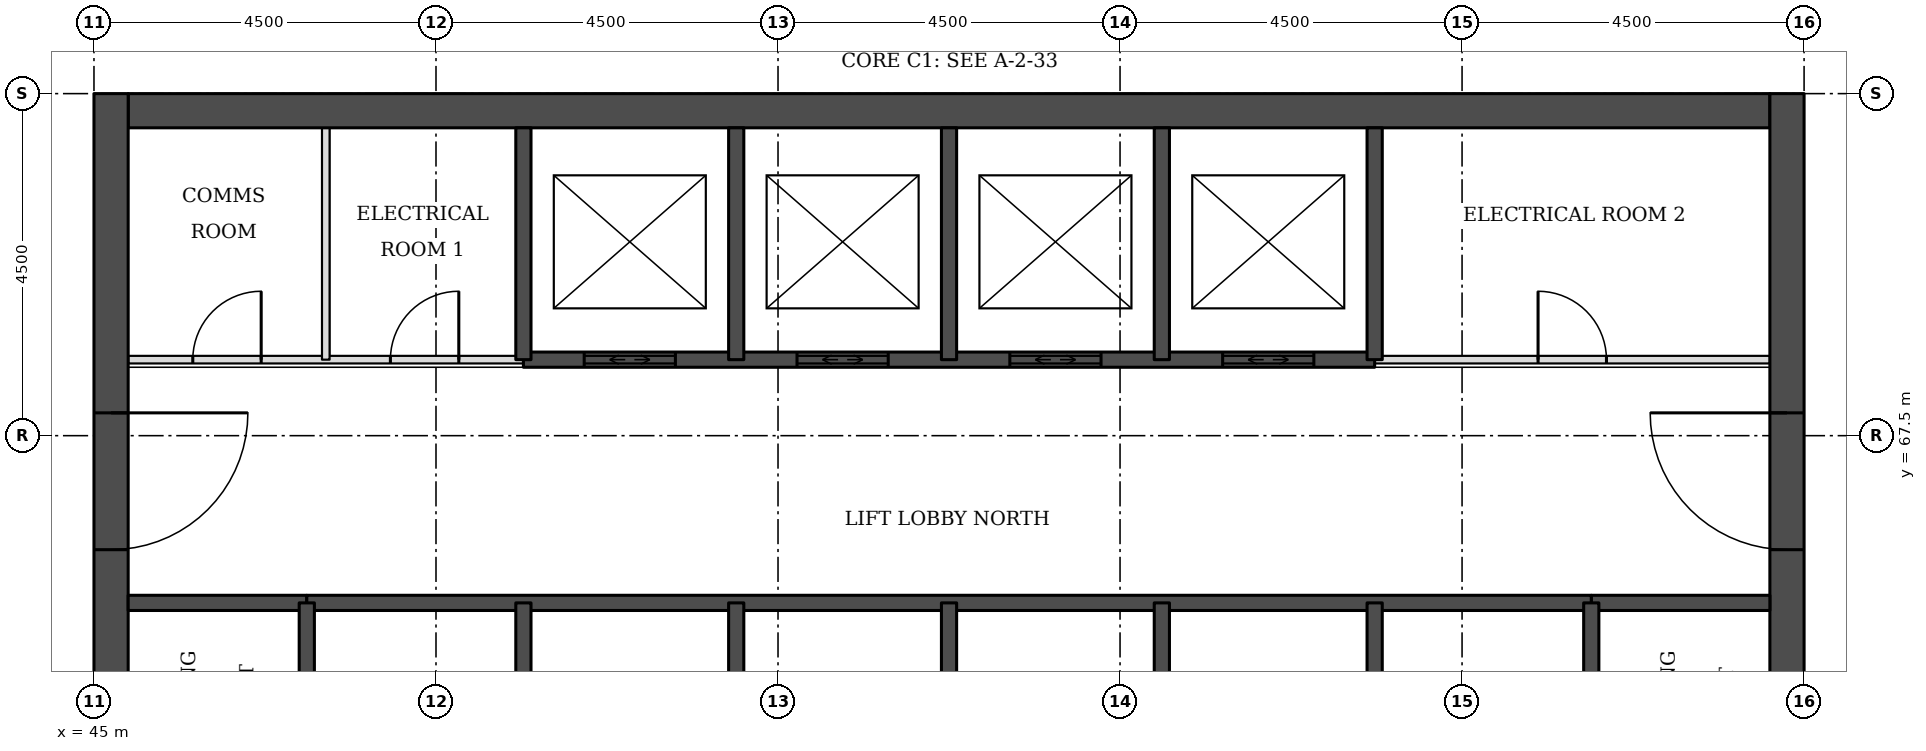
"""IFC4 building model, lengths in metres.
Left out: names, types, materials, properties, quantities, classifications, styles, units other than length and angle.
Written with IfcOpenShell. Run it as: python <this file> out.ifc"""

import sys

from ifc_helpers import new_model, si_unit, direction, frame, frame_2d, origin, place, context, subcontext, project, spatial, rectangle, extrude, element, fill, save


model = new_model("IFC4")
c1 = context("Model", 3, precision=1e-05, world=origin(), true_north=direction((0.0, 1.0)))
c2 = subcontext(c1, "Body", "Model", "MODEL_VIEW")
j1 = project(units=[si_unit("LENGTHUNIT", "METRE"), si_unit("PLANEANGLEUNIT", "RADIAN")], contexts=[c1])
p1 = place(None, origin())
s1 = spatial("IfcSite", under=j1, at=p1, CompositionType="ELEMENT")
p2 = place(p1, origin())
s2 = spatial("IfcBuilding", under=s1, at=p2, CompositionType="ELEMENT")
p3 = place(p2, frame((0.0, 0.0, 127.0)))
s3 = spatial("IfcBuildingStorey", under=s2, at=p3, CompositionType="ELEMENT", Elevation=127.0)
p4 = place(p3, frame((45.45, 71.775, 0.0), z_axis=(0.0, 0.0, 1.0), x_axis=(1.0, 0.0, 0.0)))
e1 = element("IfcWall", 1, at=p4, inside=s3, PredefinedType="SHEAR", context=c2, shape_type="SweptSolid", body=[
    extrude(rectangle(XDim=21.6, YDim=0.45, at=frame_2d((10.8, 0.0))), origin(), (0.0, 0.0, 1.0), 3.7),
])
p5 = place(p3, frame((45.225, 49.5, 0.0), z_axis=(0.0, 0.0, 1.0), x_axis=(0.0, 1.0, 0.0)))
e2 = element("IfcWall", 2, at=p5, inside=s3, PredefinedType="SHEAR", context=c2, shape_type="SweptSolid", body=[
    extrude(rectangle(XDim=22.5, YDim=0.45, at=frame_2d((11.25, 0.0))), origin(), (0.0, 0.0, 1.0), 3.7),
])
p6 = place(p5, frame((4.2, 0.0, 0.0)))
e3 = element("IfcOpeningElement", 3, at=p6, cuts=e2, PredefinedType="OPENING", context=c2, shape_type="SweptSolid", body=[
    extrude(rectangle(XDim=1.8, YDim=2.1, at=frame_2d((0.9, 1.05))), frame((0.0, 0.235, 0.0), z_axis=(0.0, -1.0, 0.0), x_axis=(1.0, 0.0, 0.0)), (0.0, 0.0, 1.0), 0.47),
])
p7 = place(p5, frame((6.9, 0.0, 0.0)))
e4 = element("IfcOpeningElement", 4, at=p7, cuts=e2, PredefinedType="OPENING", context=c2, shape_type="SweptSolid", body=[
    extrude(rectangle(XDim=1.1, YDim=2.1, at=frame_2d((0.55, 1.05))), frame((0.0, 0.235, 0.0), z_axis=(0.0, -1.0, 0.0), x_axis=(1.0, 0.0, 0.0)), (0.0, 0.0, 1.0), 0.47),
])
p8 = place(p5, frame((13.6, 0.0, 0.0)))
e5 = element("IfcOpeningElement", 5, at=p8, cuts=e2, PredefinedType="OPENING", context=c2, shape_type="SweptSolid", body=[
    extrude(rectangle(XDim=1.1, YDim=2.1, at=frame_2d((0.55, 1.05))), frame((0.0, 0.235, 0.0), z_axis=(0.0, -1.0, 0.0), x_axis=(1.0, 0.0, 0.0)), (0.0, 0.0, 1.0), 0.47),
])
p9 = place(p5, frame((16.5, 0.0, 0.0)))
e6 = element("IfcOpeningElement", 6, at=p9, cuts=e2, PredefinedType="OPENING", context=c2, shape_type="SweptSolid", body=[
    extrude(rectangle(XDim=1.8, YDim=2.1, at=frame_2d((0.9, 1.05))), frame((0.0, 0.235, 0.0), z_axis=(0.0, -1.0, 0.0), x_axis=(1.0, 0.0, 0.0)), (0.0, 0.0, 1.0), 0.47),
])
p10 = place(p3, frame((67.275, 49.5, 0.0), z_axis=(0.0, 0.0, 1.0), x_axis=(0.0, 1.0, 0.0)))
e7 = element("IfcWall", 7, at=p10, inside=s3, PredefinedType="SHEAR", context=c2, shape_type="SweptSolid", body=[
    extrude(rectangle(XDim=22.5, YDim=0.45, at=frame_2d((11.25, 0.0))), origin(), (0.0, 0.0, 1.0), 3.7),
])
p11 = place(p10, frame((4.2, 0.0, 0.0)))
e8 = element("IfcOpeningElement", 8, at=p11, cuts=e7, PredefinedType="OPENING", context=c2, shape_type="SweptSolid", body=[
    extrude(rectangle(XDim=1.8, YDim=2.1, at=frame_2d((0.9, 1.05))), frame((0.0, 0.235, 0.0), z_axis=(0.0, -1.0, 0.0), x_axis=(1.0, 0.0, 0.0)), (0.0, 0.0, 1.0), 0.47),
])
p12 = place(p10, frame((6.9, 0.0, 0.0)))
e9 = element("IfcOpeningElement", 9, at=p12, cuts=e7, PredefinedType="OPENING", context=c2, shape_type="SweptSolid", body=[
    extrude(rectangle(XDim=1.1, YDim=2.1, at=frame_2d((0.55, 1.05))), frame((0.0, 0.235, 0.0), z_axis=(0.0, -1.0, 0.0), x_axis=(1.0, 0.0, 0.0)), (0.0, 0.0, 1.0), 0.47),
])
p13 = place(p10, frame((13.6, 0.0, 0.0)))
e10 = element("IfcOpeningElement", 10, at=p13, cuts=e7, PredefinedType="OPENING", context=c2, shape_type="SweptSolid", body=[
    extrude(rectangle(XDim=1.1, YDim=2.1, at=frame_2d((0.55, 1.05))), frame((0.0, 0.235, 0.0), z_axis=(0.0, -1.0, 0.0), x_axis=(1.0, 0.0, 0.0)), (0.0, 0.0, 1.0), 0.47),
])
p14 = place(p10, frame((16.5, 0.0, 0.0)))
e11 = element("IfcOpeningElement", 11, at=p14, cuts=e7, PredefinedType="OPENING", context=c2, shape_type="SweptSolid", body=[
    extrude(rectangle(XDim=1.8, YDim=2.1, at=frame_2d((0.9, 1.05))), frame((0.0, 0.235, 0.0), z_axis=(0.0, -1.0, 0.0), x_axis=(1.0, 0.0, 0.0)), (0.0, 0.0, 1.0), 0.47),
])
for number, where, z_axis, x_axis in (
    (12, (45.45, 65.3, 0.0), (0.0, 0.0, 1.0), (1.0, 0.0, 0.0)),
    (13, (64.7, 65.3, 0.0), (0.0, 0.0, 1.0), (1.0, 0.0, 0.0)),
):
    element("IfcWall", number, at=place(p3, frame(where, z_axis=z_axis, x_axis=x_axis)), inside=s3, PredefinedType="SOLIDWALL", context=c2, shape_type="SweptSolid", body=[
        extrude(rectangle(XDim=2.35, YDim=0.2, at=frame_2d((1.175, 0.0))), origin(), (0.0, 0.0, 1.0), 3.55),
    ])
p15 = place(p3, frame((47.8, 65.3, 0.0), z_axis=(0.0, 0.0, 1.0), x_axis=(1.0, 0.0, 0.0)))
e14 = element("IfcWall", 14, at=p15, inside=s3, PredefinedType="SOLIDWALL", context=c2, shape_type="SweptSolid", body=[
    extrude(rectangle(XDim=16.9, YDim=0.2, at=frame_2d((8.45, 0.0))), origin(), (0.0, 0.0, 1.0), 3.55),
])
p16 = place(p3, frame((45.45, 68.5, 0.0), z_axis=(0.0, 0.0, 1.0), x_axis=(1.0, 0.0, 0.0)))
e15 = element("IfcWall", 15, at=p16, inside=s3, PredefinedType="PARTITIONING", context=c2, shape_type="SweptSolid", body=[
    extrude(rectangle(XDim=5.2, YDim=0.1, at=frame_2d((2.6, 0.0))), origin(), (0.0, 0.0, 1.0), 3.55),
])
p17 = place(p16, frame((0.85, 0.0, 0.0)))
e16 = element("IfcOpeningElement", 16, at=p17, cuts=e15, PredefinedType="OPENING", context=c2, shape_type="SweptSolid", body=[
    extrude(rectangle(XDim=0.9, YDim=2.1, at=frame_2d((0.45, 1.05))), frame((0.0, 0.06, 0.0), z_axis=(0.0, -1.0, 0.0), x_axis=(1.0, 0.0, 0.0)), (0.0, 0.0, 1.0), 0.12),
])
p18 = place(p16, frame((3.45, 0.0, 0.0)))
e17 = element("IfcOpeningElement", 17, at=p18, cuts=e15, PredefinedType="OPENING", context=c2, shape_type="SweptSolid", body=[
    extrude(rectangle(XDim=0.9, YDim=2.1, at=frame_2d((0.45, 1.05))), frame((0.0, 0.06, 0.0), z_axis=(0.0, -1.0, 0.0), x_axis=(1.0, 0.0, 0.0)), (0.0, 0.0, 1.0), 0.12),
])
p19 = place(p3, frame((61.85, 68.5, 0.0), z_axis=(0.0, 0.0, 1.0), x_axis=(1.0, 0.0, 0.0)))
e18 = element("IfcWall", 18, at=p19, inside=s3, PredefinedType="PARTITIONING", context=c2, shape_type="SweptSolid", body=[
    extrude(rectangle(XDim=5.2, YDim=0.1, at=frame_2d((2.6, 0.0))), origin(), (0.0, 0.0, 1.0), 3.55),
])
p20 = place(p19, frame((2.15, 0.0, 0.0)))
e19 = element("IfcOpeningElement", 19, at=p20, cuts=e18, PredefinedType="OPENING", context=c2, shape_type="SweptSolid", body=[
    extrude(rectangle(XDim=0.9, YDim=2.1, at=frame_2d((0.45, 1.05))), frame((0.0, 0.06, 0.0), z_axis=(0.0, -1.0, 0.0), x_axis=(1.0, 0.0, 0.0)), (0.0, 0.0, 1.0), 0.12),
])
p21 = place(p3, frame((50.65, 68.5, 0.0), z_axis=(0.0, 0.0, 1.0), x_axis=(1.0, 0.0, 0.0)))
e20 = element("IfcWall", 20, at=p21, inside=s3, PredefinedType="SOLIDWALL", context=c2, shape_type="SweptSolid", body=[
    extrude(rectangle(XDim=11.2, YDim=0.2, at=frame_2d((5.6, 0.0))), origin(), (0.0, 0.0, 1.0), 3.55),
])
p22 = place(p21, frame((0.8, 0.0, 0.0)))
e21 = element("IfcOpeningElement", 21, at=p22, cuts=e20, PredefinedType="OPENING", context=c2, shape_type="SweptSolid", body=[
    extrude(rectangle(XDim=1.2, YDim=2.1, at=frame_2d((0.6, 1.05))), frame((0.0, 0.11, 0.0), z_axis=(0.0, -1.0, 0.0), x_axis=(1.0, 0.0, 0.0)), (0.0, 0.0, 1.0), 0.22),
])
p23 = place(p21, frame((3.6, 0.0, 0.0)))
e22 = element("IfcOpeningElement", 22, at=p23, cuts=e20, PredefinedType="OPENING", context=c2, shape_type="SweptSolid", body=[
    extrude(rectangle(XDim=1.2, YDim=2.1, at=frame_2d((0.6, 1.05))), frame((0.0, 0.11, 0.0), z_axis=(0.0, -1.0, 0.0), x_axis=(1.0, 0.0, 0.0)), (0.0, 0.0, 1.0), 0.22),
])
p24 = place(p21, frame((6.4, 0.0, 0.0)))
e23 = element("IfcOpeningElement", 23, at=p24, cuts=e20, PredefinedType="OPENING", context=c2, shape_type="SweptSolid", body=[
    extrude(rectangle(XDim=1.2, YDim=2.1, at=frame_2d((0.6, 1.05))), frame((0.0, 0.11, 0.0), z_axis=(0.0, -1.0, 0.0), x_axis=(1.0, 0.0, 0.0)), (0.0, 0.0, 1.0), 0.22),
])
p25 = place(p21, frame((9.2, 0.0, 0.0)))
e24 = element("IfcOpeningElement", 24, at=p25, cuts=e20, PredefinedType="OPENING", context=c2, shape_type="SweptSolid", body=[
    extrude(rectangle(XDim=1.2, YDim=2.1, at=frame_2d((0.6, 1.05))), frame((0.0, 0.11, 0.0), z_axis=(0.0, -1.0, 0.0), x_axis=(1.0, 0.0, 0.0)), (0.0, 0.0, 1.0), 0.22),
])
p26 = place(p3, frame((47.8, 62.0, 0.0), z_axis=(0.0, 0.0, 1.0), x_axis=(0.0, 1.0, 0.0)))
e25 = element("IfcWall", 25, at=p26, inside=s3, PredefinedType="SOLIDWALL", context=c2, shape_type="SweptSolid", body=[
    extrude(rectangle(XDim=3.3, YDim=0.2, at=frame_2d((1.65, 0.0))), origin(), (0.0, 0.0, 1.0), 3.55),
])
p27 = place(p26, frame((1.1, 0.0, 0.0)))
e26 = element("IfcOpeningElement", 26, at=p27, cuts=e25, PredefinedType="OPENING", context=c2, shape_type="SweptSolid", body=[
    extrude(rectangle(XDim=1.1, YDim=2.1, at=frame_2d((0.55, 1.05))), frame((0.0, 0.11, 0.0), z_axis=(0.0, -1.0, 0.0), x_axis=(1.0, 0.0, 0.0)), (0.0, 0.0, 1.0), 0.22),
])
p28 = place(p3, frame((48.05, 68.5, 0.0), z_axis=(0.0, 0.0, 1.0), x_axis=(0.0, 1.0, 0.0)))
e27 = element("IfcWall", 27, at=p28, inside=s3, PredefinedType="PARTITIONING", context=c2, shape_type="SweptSolid", body=[
    extrude(rectangle(XDim=3.05, YDim=0.1, at=frame_2d((1.525, 0.0))), origin(), (0.0, 0.0, 1.0), 3.55),
])
p29 = place(p3, frame((50.65, 62.0, 0.0), z_axis=(0.0, 0.0, 1.0), x_axis=(0.0, 1.0, 0.0)))
e28 = element("IfcWall", 28, at=p29, inside=s3, PredefinedType="SOLIDWALL", context=c2, shape_type="SweptSolid", body=[
    extrude(rectangle(XDim=3.3, YDim=0.2, at=frame_2d((1.65, 0.0))), origin(), (0.0, 0.0, 1.0), 3.55),
])
p30 = place(p3, frame((50.65, 68.5, 0.0), z_axis=(0.0, 0.0, 1.0), x_axis=(0.0, 1.0, 0.0)))
e29 = element("IfcWall", 29, at=p30, inside=s3, PredefinedType="SOLIDWALL", context=c2, shape_type="SweptSolid", body=[
    extrude(rectangle(XDim=3.05, YDim=0.2, at=frame_2d((1.525, 0.0))), origin(), (0.0, 0.0, 1.0), 3.55),
])
p31 = place(p3, frame((53.45, 62.5, 0.0), z_axis=(0.0, 0.0, 1.0), x_axis=(0.0, 1.0, 0.0)))
e30 = element("IfcWall", 30, at=p31, inside=s3, PredefinedType="SOLIDWALL", context=c2, shape_type="SweptSolid", body=[
    extrude(rectangle(XDim=2.8, YDim=0.2, at=frame_2d((1.4, 0.0))), origin(), (0.0, 0.0, 1.0), 3.55),
])
p32 = place(p3, frame((53.45, 68.5, 0.0), z_axis=(0.0, 0.0, 1.0), x_axis=(0.0, 1.0, 0.0)))
e31 = element("IfcWall", 31, at=p32, inside=s3, PredefinedType="SOLIDWALL", context=c2, shape_type="SweptSolid", body=[
    extrude(rectangle(XDim=3.05, YDim=0.2, at=frame_2d((1.525, 0.0))), origin(), (0.0, 0.0, 1.0), 3.55),
])
p33 = place(p3, frame((56.25, 62.5, 0.0), z_axis=(0.0, 0.0, 1.0), x_axis=(0.0, 1.0, 0.0)))
e32 = element("IfcWall", 32, at=p33, inside=s3, PredefinedType="SOLIDWALL", context=c2, shape_type="SweptSolid", body=[
    extrude(rectangle(XDim=2.8, YDim=0.2, at=frame_2d((1.4, 0.0))), origin(), (0.0, 0.0, 1.0), 3.55),
])
p34 = place(p3, frame((56.25, 68.5, 0.0), z_axis=(0.0, 0.0, 1.0), x_axis=(0.0, 1.0, 0.0)))
e33 = element("IfcWall", 33, at=p34, inside=s3, PredefinedType="SOLIDWALL", context=c2, shape_type="SweptSolid", body=[
    extrude(rectangle(XDim=3.05, YDim=0.2, at=frame_2d((1.525, 0.0))), origin(), (0.0, 0.0, 1.0), 3.55),
])
p35 = place(p3, frame((59.05, 62.5, 0.0), z_axis=(0.0, 0.0, 1.0), x_axis=(0.0, 1.0, 0.0)))
e34 = element("IfcWall", 34, at=p35, inside=s3, PredefinedType="SOLIDWALL", context=c2, shape_type="SweptSolid", body=[
    extrude(rectangle(XDim=2.8, YDim=0.2, at=frame_2d((1.4, 0.0))), origin(), (0.0, 0.0, 1.0), 3.55),
])
p36 = place(p3, frame((59.05, 68.5, 0.0), z_axis=(0.0, 0.0, 1.0), x_axis=(0.0, 1.0, 0.0)))
e35 = element("IfcWall", 35, at=p36, inside=s3, PredefinedType="SOLIDWALL", context=c2, shape_type="SweptSolid", body=[
    extrude(rectangle(XDim=3.05, YDim=0.2, at=frame_2d((1.525, 0.0))), origin(), (0.0, 0.0, 1.0), 3.55),
])
p37 = place(p3, frame((61.85, 62.0, 0.0), z_axis=(0.0, 0.0, 1.0), x_axis=(0.0, 1.0, 0.0)))
e36 = element("IfcWall", 36, at=p37, inside=s3, PredefinedType="SOLIDWALL", context=c2, shape_type="SweptSolid", body=[
    extrude(rectangle(XDim=3.3, YDim=0.2, at=frame_2d((1.65, 0.0))), origin(), (0.0, 0.0, 1.0), 3.55),
])
p38 = place(p3, frame((61.85, 68.5, 0.0), z_axis=(0.0, 0.0, 1.0), x_axis=(0.0, 1.0, 0.0)))
e37 = element("IfcWall", 37, at=p38, inside=s3, PredefinedType="SOLIDWALL", context=c2, shape_type="SweptSolid", body=[
    extrude(rectangle(XDim=3.05, YDim=0.2, at=frame_2d((1.525, 0.0))), origin(), (0.0, 0.0, 1.0), 3.55),
])
p39 = place(p3, frame((64.7, 62.0, 0.0), z_axis=(0.0, 0.0, 1.0), x_axis=(0.0, 1.0, 0.0)))
e38 = element("IfcWall", 38, at=p39, inside=s3, PredefinedType="SOLIDWALL", context=c2, shape_type="SweptSolid", body=[
    extrude(rectangle(XDim=3.3, YDim=0.2, at=frame_2d((1.65, 0.0))), origin(), (0.0, 0.0, 1.0), 3.55),
])
p40 = place(p39, frame((1.1, 0.0, 0.0)))
e39 = element("IfcOpeningElement", 39, at=p40, cuts=e38, PredefinedType="OPENING", context=c2, shape_type="SweptSolid", body=[
    extrude(rectangle(XDim=1.1, YDim=2.1, at=frame_2d((0.55, 1.05))), frame((0.0, 0.11, 0.0), z_axis=(0.0, -1.0, 0.0), x_axis=(1.0, 0.0, 0.0)), (0.0, 0.0, 1.0), 0.22),
])
p41 = place(p22, origin())
e40 = element("IfcDoor", 40, at=p41, inside=s3, OperationType="DOUBLE_DOOR_SLIDING", PredefinedType="DOOR", context=c2, shape_type="SweptSolid", body=[
    extrude(rectangle(XDim=1.2, YDim=2.1, at=frame_2d((0.6, 1.05))), frame((0.0, 0.025, 0.0), z_axis=(0.0, -1.0, 0.0), x_axis=(1.0, 0.0, 0.0)), (0.0, 0.0, 1.0), 0.05),
])
fill(e21, e40)
p42 = place(p23, origin())
e41 = element("IfcDoor", 41, at=p42, inside=s3, OperationType="DOUBLE_DOOR_SLIDING", PredefinedType="DOOR", context=c2, shape_type="SweptSolid", body=[
    extrude(rectangle(XDim=1.2, YDim=2.1, at=frame_2d((0.6, 1.05))), frame((0.0, 0.025, 0.0), z_axis=(0.0, -1.0, 0.0), x_axis=(1.0, 0.0, 0.0)), (0.0, 0.0, 1.0), 0.05),
])
fill(e22, e41)
p43 = place(p24, origin())
e42 = element("IfcDoor", 42, at=p43, inside=s3, OperationType="DOUBLE_DOOR_SLIDING", PredefinedType="DOOR", context=c2, shape_type="SweptSolid", body=[
    extrude(rectangle(XDim=1.2, YDim=2.1, at=frame_2d((0.6, 1.05))), frame((0.0, 0.025, 0.0), z_axis=(0.0, -1.0, 0.0), x_axis=(1.0, 0.0, 0.0)), (0.0, 0.0, 1.0), 0.05),
])
fill(e23, e42)
p44 = place(p25, origin())
e43 = element("IfcDoor", 43, at=p44, inside=s3, OperationType="DOUBLE_DOOR_SLIDING", PredefinedType="DOOR", context=c2, shape_type="SweptSolid", body=[
    extrude(rectangle(XDim=1.2, YDim=2.1, at=frame_2d((0.6, 1.05))), frame((0.0, 0.025, 0.0), z_axis=(0.0, -1.0, 0.0), x_axis=(1.0, 0.0, 0.0)), (0.0, 0.0, 1.0), 0.05),
])
fill(e24, e43)
p45 = place(p9, frame((1.8, 0.0, 0.0), z_axis=(0.0, 0.0, 1.0), x_axis=(-1.0, 0.0, 0.0)))
e44 = element("IfcDoor", 44, at=p45, inside=s3, OperationType="SINGLE_SWING_LEFT", PredefinedType="DOOR", context=c2, shape_type="SweptSolid", body=[
    extrude(rectangle(XDim=1.8, YDim=2.1, at=frame_2d((0.9, 1.05))), frame((0.0, 0.025, 0.0), z_axis=(0.0, -1.0, 0.0), x_axis=(1.0, 0.0, 0.0)), (0.0, 0.0, 1.0), 0.05),
])
fill(e6, e44)
p46 = place(p14, origin())
e45 = element("IfcDoor", 45, at=p46, inside=s3, OperationType="SINGLE_SWING_RIGHT", PredefinedType="DOOR", context=c2, shape_type="SweptSolid", body=[
    extrude(rectangle(XDim=1.8, YDim=2.1, at=frame_2d((0.9, 1.05))), frame((0.0, 0.025, 0.0), z_axis=(0.0, -1.0, 0.0), x_axis=(1.0, 0.0, 0.0)), (0.0, 0.0, 1.0), 0.05),
])
fill(e11, e45)
p47 = place(p20, origin())
e46 = element("IfcDoor", 46, at=p47, inside=s3, OperationType="SINGLE_SWING_LEFT", PredefinedType="DOOR", context=c2, shape_type="SweptSolid", body=[
    extrude(rectangle(XDim=0.9, YDim=2.1, at=frame_2d((0.45, 1.05))), frame((0.0, 0.025, 0.0), z_axis=(0.0, -1.0, 0.0), x_axis=(1.0, 0.0, 0.0)), (0.0, 0.0, 1.0), 0.05),
])
fill(e19, e46)
p48 = place(p17, origin())
e47 = element("IfcDoor", 47, at=p48, inside=s3, OperationType="SINGLE_SWING_RIGHT", PredefinedType="DOOR", context=c2, shape_type="SweptSolid", body=[
    extrude(rectangle(XDim=0.9, YDim=2.1, at=frame_2d((0.45, 1.05))), frame((0.0, 0.025, 0.0), z_axis=(0.0, -1.0, 0.0), x_axis=(1.0, 0.0, 0.0)), (0.0, 0.0, 1.0), 0.05),
])
fill(e16, e47)
p49 = place(p18, origin())
e48 = element("IfcDoor", 48, at=p49, inside=s3, OperationType="SINGLE_SWING_RIGHT", PredefinedType="DOOR", context=c2, shape_type="SweptSolid", body=[
    extrude(rectangle(XDim=0.9, YDim=2.1, at=frame_2d((0.45, 1.05))), frame((0.0, 0.025, 0.0), z_axis=(0.0, -1.0, 0.0), x_axis=(1.0, 0.0, 0.0)), (0.0, 0.0, 1.0), 0.05),
])
fill(e17, e48)
save(model, sys.argv[1])
